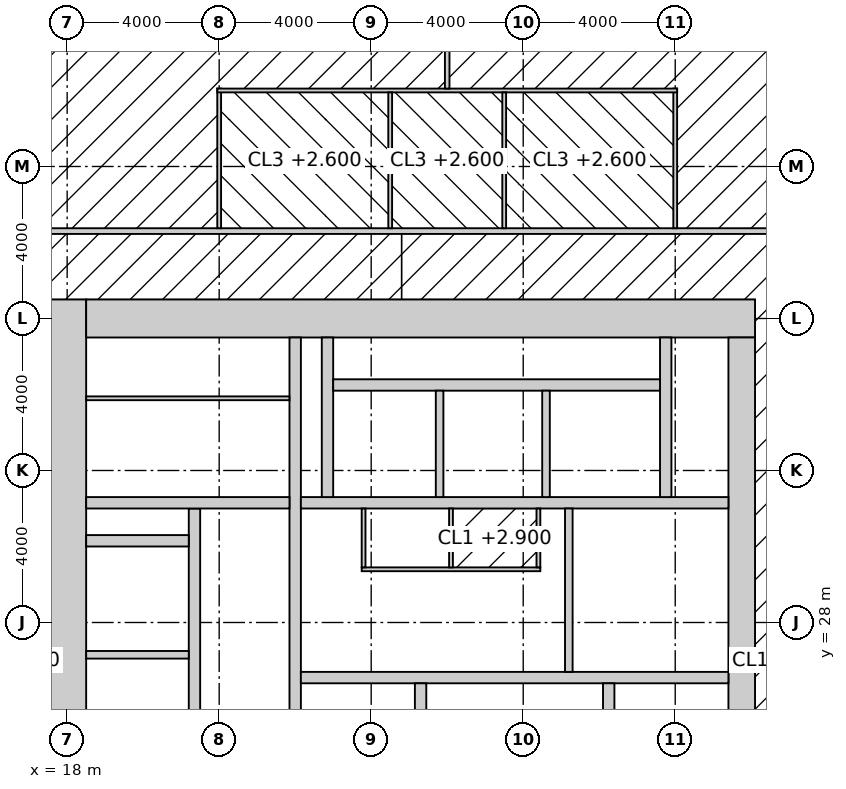
"""IFC4 building model, lengths in metres.
Left out: names, types, materials, properties, quantities, classifications, styles, units other than length and angle.
Written with IfcOpenShell. Run it as: python <this file> out.ifc"""

import sys

from ifc_helpers import new_model, si_unit, direction, frame, frame_2d, origin, place, context, subcontext, project, spatial, rectangle, extrude, element, fill, save


model = new_model("IFC4")
c1 = context("Model", 3, precision=1e-05, world=origin(), true_north=direction((0.0, 1.0)))
c2 = subcontext(c1, "Body", "Model", "MODEL_VIEW")
j1 = project(units=[si_unit("LENGTHUNIT", "METRE"), si_unit("PLANEANGLEUNIT", "RADIAN")], contexts=[c1])
p1 = place(None, origin())
s1 = spatial("IfcSite", under=j1, at=p1, CompositionType="ELEMENT")
p2 = place(p1, origin())
s2 = spatial("IfcBuilding", under=s1, at=p2, CompositionType="ELEMENT")
p3 = place(p2, frame((0.0, 0.0, 147.8)))
s3 = spatial("IfcBuildingStorey", under=s2, at=p3, CompositionType="ELEMENT", Elevation=147.8)
p4 = place(p3, frame((18.0, 17.5, -0.15), z_axis=(0.0, 0.0, 1.0), x_axis=(0.0, 1.0, 0.0)))
e1 = element("IfcWall", 1, at=p4, inside=s3, PredefinedType="SHEAR", context=c2, shape_type="SweptSolid", body=[
    extrude(rectangle(XDim=19.0, YDim=1.0, at=frame_2d((9.5, 0.0))), origin(), (0.0, 0.0, 1.0), 4.0),
])
p5 = place(p3, frame((18.5, 36.0, -0.15), z_axis=(0.0, 0.0, 1.0), x_axis=(1.0, 0.0, 0.0)))
e2 = element("IfcWall", 2, at=p5, inside=s3, PredefinedType="SHEAR", context=c2, shape_type="SweptSolid", body=[
    extrude(rectangle(XDim=17.6, YDim=1.0, at=frame_2d((8.8, 0.0))), origin(), (0.0, 0.0, 1.0), 4.0),
])
p6 = place(p3, frame((35.75, 18.5, -0.15), z_axis=(0.0, 0.0, 1.0), x_axis=(0.0, 1.0, 0.0)))
e3 = element("IfcWall", 3, at=p6, inside=s3, PredefinedType="SHEAR", context=c2, shape_type="SweptSolid", body=[
    extrude(rectangle(XDim=17.0, YDim=0.7, at=frame_2d((8.5, 0.0))), origin(), (0.0, 0.0, 1.0), 4.0),
])
p7 = place(p6, frame((9.85, 0.0, 0.15)))
e4 = element("IfcOpeningElement", 4, at=p7, cuts=e3, PredefinedType="OPENING", context=c2, shape_type="SweptSolid", body=[
    extrude(rectangle(XDim=1.0, YDim=2.2, at=frame_2d((0.5, 1.1))), frame((0.0, 0.36, 0.0), z_axis=(0.0, -1.0, 0.0), x_axis=(1.0, 0.0, 0.0)), (0.0, 0.0, 1.0), 0.72),
])
p8 = place(p3, frame((24.0, 18.5, -0.15), z_axis=(0.0, 0.0, 1.0), x_axis=(0.0, 1.0, 0.0)))
e5 = element("IfcWall", 5, at=p8, inside=s3, PredefinedType="SHEAR", context=c2, shape_type="SweptSolid", body=[
    extrude(rectangle(XDim=17.0, YDim=0.3, at=frame_2d((8.5, 0.0))), origin(), (0.0, 0.0, 1.0), 4.0),
])
p9 = place(p8, frame((9.6, 0.0, 0.15)))
e6 = element("IfcOpeningElement", 6, at=p9, cuts=e5, PredefinedType="OPENING", context=c2, shape_type="SweptSolid", body=[
    extrude(rectangle(XDim=1.5, YDim=2.4, at=frame_2d((0.75, 1.2))), frame((0.0, 0.16, 0.0), z_axis=(0.0, -1.0, 0.0), x_axis=(1.0, 0.0, 0.0)), (0.0, 0.0, 1.0), 0.32),
])
p10 = place(p3, frame((24.15, 26.55, -0.15), z_axis=(0.0, 0.0, 1.0), x_axis=(1.0, 0.0, 0.0)))
e7 = element("IfcWall", 7, at=p10, inside=s3, PredefinedType="SHEAR", context=c2, shape_type="SweptSolid", body=[
    extrude(rectangle(XDim=11.25, YDim=0.3, at=frame_2d((5.625, 0.0))), origin(), (0.0, 0.0, 1.0), 4.0),
])
p11 = place(p10, frame((9.25, 0.0, 0.15)))
e8 = element("IfcOpeningElement", 8, at=p11, cuts=e7, PredefinedType="OPENING", context=c2, shape_type="SweptSolid", body=[
    extrude(rectangle(XDim=1.0, YDim=2.2, at=frame_2d((0.5, 1.1))), frame((0.0, 0.16, 0.0), z_axis=(0.0, -1.0, 0.0), x_axis=(1.0, 0.0, 0.0)), (0.0, 0.0, 1.0), 0.32),
])
p12 = place(p10, frame((4.9, 0.0, 0.15)))
e9 = element("IfcOpeningElement", 9, at=p12, cuts=e7, PredefinedType="OPENING", context=c2, shape_type="SweptSolid", body=[
    extrude(rectangle(XDim=1.5, YDim=2.4, at=frame_2d((0.75, 1.2))), frame((0.0, 0.16, 0.0), z_axis=(0.0, -1.0, 0.0), x_axis=(1.0, 0.0, 0.0)), (0.0, 0.0, 1.0), 0.32),
])
p13 = place(p3, frame((27.3, 18.5, -0.15), z_axis=(0.0, 0.0, 1.0), x_axis=(0.0, 1.0, 0.0)))
e10 = element("IfcWall", 10, at=p13, inside=s3, PredefinedType="SHEAR", context=c2, shape_type="SweptSolid", body=[
    extrude(rectangle(XDim=7.9, YDim=0.3, at=frame_2d((3.95, 0.0))), origin(), (0.0, 0.0, 1.0), 4.0),
])
p14 = place(p13, frame((6.4, 0.0, 0.15)))
e11 = element("IfcOpeningElement", 11, at=p14, cuts=e10, PredefinedType="OPENING", context=c2, shape_type="SweptSolid", body=[
    extrude(rectangle(XDim=1.0, YDim=2.2, at=frame_2d((0.5, 1.1))), frame((0.0, 0.16, 0.0), z_axis=(0.0, -1.0, 0.0), x_axis=(1.0, 0.0, 0.0)), (0.0, 0.0, 1.0), 0.32),
])
p15 = place(p3, frame((32.25, 18.5, -0.15), z_axis=(0.0, 0.0, 1.0), x_axis=(0.0, 1.0, 0.0)))
e12 = element("IfcWall", 12, at=p15, inside=s3, PredefinedType="SHEAR", context=c2, shape_type="SweptSolid", body=[
    extrude(rectangle(XDim=7.9, YDim=0.3, at=frame_2d((3.95, 0.0))), origin(), (0.0, 0.0, 1.0), 4.0),
])
p16 = place(p3, frame((24.15, 31.15, -0.15), z_axis=(0.0, 0.0, 1.0), x_axis=(1.0, 0.0, 0.0)))
e13 = element("IfcWall", 13, at=p16, inside=s3, PredefinedType="SHEAR", context=c2, shape_type="SweptSolid", body=[
    extrude(rectangle(XDim=11.25, YDim=0.3, at=frame_2d((5.625, 0.0))), origin(), (0.0, 0.0, 1.0), 4.0),
])
p17 = place(p16, frame((7.25, 0.0, 0.15)))
e14 = element("IfcOpeningElement", 14, at=p17, cuts=e13, PredefinedType="OPENING", context=c2, shape_type="SweptSolid", body=[
    extrude(rectangle(XDim=1.4, YDim=2.4, at=frame_2d((0.7, 1.2))), frame((0.0, 0.16, 0.0), z_axis=(0.0, -1.0, 0.0), x_axis=(1.0, 0.0, 0.0)), (0.0, 0.0, 1.0), 0.32),
])
p18 = place(p3, frame((21.35, 18.5, -0.15), z_axis=(0.0, 0.0, 1.0), x_axis=(0.0, 1.0, 0.0)))
e15 = element("IfcWall", 15, at=p18, inside=s3, PredefinedType="SHEAR", context=c2, shape_type="SweptSolid", body=[
    extrude(rectangle(XDim=12.5, YDim=0.3, at=frame_2d((6.25, 0.0))), origin(), (0.0, 0.0, 1.0), 4.0),
])
p19 = place(p18, frame((0.875, 0.0, 0.15)))
e16 = element("IfcOpeningElement", 16, at=p19, cuts=e15, PredefinedType="OPENING", context=c2, shape_type="SweptSolid", body=[
    extrude(rectangle(XDim=1.1, YDim=2.2, at=frame_2d((0.55, 1.1))), frame((0.0, 0.16, 0.0), z_axis=(0.0, -1.0, 0.0), x_axis=(1.0, 0.0, 0.0)), (0.0, 0.0, 1.0), 0.32),
])
p20 = place(p18, frame((3.825, 0.0, 0.15)))
e17 = element("IfcOpeningElement", 17, at=p20, cuts=e15, PredefinedType="OPENING", context=c2, shape_type="SweptSolid", body=[
    extrude(rectangle(XDim=1.1, YDim=2.2, at=frame_2d((0.55, 1.1))), frame((0.0, 0.16, 0.0), z_axis=(0.0, -1.0, 0.0), x_axis=(1.0, 0.0, 0.0)), (0.0, 0.0, 1.0), 0.32),
])
p21 = place(p18, frame((6.675, 0.0, 0.15)))
e18 = element("IfcOpeningElement", 18, at=p21, cuts=e15, PredefinedType="OPENING", context=c2, shape_type="SweptSolid", body=[
    extrude(rectangle(XDim=1.1, YDim=2.2, at=frame_2d((0.55, 1.1))), frame((0.0, 0.16, 0.0), z_axis=(0.0, -1.0, 0.0), x_axis=(1.0, 0.0, 0.0)), (0.0, 0.0, 1.0), 0.32),
])
p22 = place(p18, frame((9.575, 0.0, 0.15)))
e19 = element("IfcOpeningElement", 19, at=p22, cuts=e15, PredefinedType="OPENING", context=c2, shape_type="SweptSolid", body=[
    extrude(rectangle(XDim=1.1, YDim=2.2, at=frame_2d((0.55, 1.1))), frame((0.0, 0.16, 0.0), z_axis=(0.0, -1.0, 0.0), x_axis=(1.0, 0.0, 0.0)), (0.0, 0.0, 1.0), 0.32),
])
p23 = place(p3, frame((18.5, 31.15, -0.15), z_axis=(0.0, 0.0, 1.0), x_axis=(1.0, 0.0, 0.0)))
e20 = element("IfcWall", 20, at=p23, inside=s3, PredefinedType="SHEAR", context=c2, shape_type="SweptSolid", body=[
    extrude(rectangle(XDim=5.35, YDim=0.3, at=frame_2d((2.675, 0.0))), origin(), (0.0, 0.0, 1.0), 4.0),
])
p24 = place(p23, frame((3.4, 0.0, 0.15)))
e21 = element("IfcOpeningElement", 21, at=p24, cuts=e20, PredefinedType="OPENING", context=c2, shape_type="SweptSolid", body=[
    extrude(rectangle(XDim=1.0, YDim=2.2, at=frame_2d((0.5, 1.1))), frame((0.0, 0.16, 0.0), z_axis=(0.0, -1.0, 0.0), x_axis=(1.0, 0.0, 0.0)), (0.0, 0.0, 1.0), 0.32),
])
p25 = place(p3, frame((18.5, 30.15, -0.15), z_axis=(0.0, 0.0, 1.0), x_axis=(1.0, 0.0, 0.0)))
e22 = element("IfcWall", 22, at=p25, inside=s3, PredefinedType="SHEAR", context=c2, shape_type="SweptSolid", body=[
    extrude(rectangle(XDim=2.7, YDim=0.3, at=frame_2d((1.35, 0.0))), origin(), (0.0, 0.0, 1.0), 4.0),
])
for number, where, z_axis, x_axis in (
    (23, (24.85, 31.3, -0.15), (0.0, 0.0, 1.0), (0.0, 1.0, 0.0)),
    (24, (33.75, 31.3, -0.15), (0.0, 0.0, 1.0), (0.0, 1.0, 0.0)),
):
    element("IfcWall", number, at=place(p3, frame(where, z_axis=z_axis, x_axis=x_axis)), inside=s3, PredefinedType="SHEAR", context=c2, shape_type="SweptSolid", body=[
        extrude(rectangle(XDim=4.2, YDim=0.3, at=frame_2d((2.1, 0.0))), origin(), (0.0, 0.0, 1.0), 4.0),
    ])
p26 = place(p3, frame((25.0, 34.25, -0.15), z_axis=(0.0, 0.0, 1.0), x_axis=(1.0, 0.0, 0.0)))
e25 = element("IfcWall", 25, at=p26, inside=s3, PredefinedType="SHEAR", context=c2, shape_type="SweptSolid", body=[
    extrude(rectangle(XDim=8.6, YDim=0.3, at=frame_2d((4.3, 0.0))), origin(), (0.0, 0.0, 1.0), 4.0),
])
for number, where, z_axis, x_axis in (
    (26, (27.8, 31.3, -0.15), (0.0, 0.0, 1.0), (0.0, 1.0, 0.0)),
    (27, (30.6, 31.3, -0.15), (0.0, 0.0, 1.0), (0.0, 1.0, 0.0)),
):
    element("IfcWall", number, at=place(p3, frame(where, z_axis=z_axis, x_axis=x_axis)), inside=s3, PredefinedType="SOLIDWALL", context=c2, shape_type="SweptSolid", body=[
        extrude(rectangle(XDim=2.8, YDim=0.2, at=frame_2d((1.4, 0.0))), origin(), (0.0, 0.0, 1.0), 4.0),
    ])
p27 = place(p3, frame((18.5, 27.15, -0.15), z_axis=(0.0, 0.0, 1.0), x_axis=(1.0, 0.0, 0.0)))
e28 = element("IfcWall", 28, at=p27, inside=s3, PredefinedType="SOLIDWALL", context=c2, shape_type="SweptSolid", body=[
    extrude(rectangle(XDim=2.7, YDim=0.2, at=frame_2d((1.35, 0.0))), origin(), (0.0, 0.0, 1.0), 4.0),
])
p28 = place(p3, frame((31.2, 26.7, 0.0), z_axis=(0.0, 0.0, 1.0), x_axis=(0.0, 1.0, 0.0)))
e29 = element("IfcWall", 29, at=p28, inside=s3, PredefinedType="SOLIDWALL", context=c2, shape_type="SweptSolid", body=[
    extrude(rectangle(XDim=4.3, YDim=0.2, at=frame_2d((2.15, 0.0))), origin(), (0.0, 0.0, 1.0), 3.85),
])
p29 = place(p3, frame((18.5, 33.9, 0.0), z_axis=(0.0, 0.0, 1.0), x_axis=(1.0, 0.0, 0.0)))
e30 = element("IfcWall", 30, at=p29, inside=s3, PredefinedType="PARTITIONING", context=c2, shape_type="SweptSolid", body=[
    extrude(rectangle(XDim=5.35, YDim=0.1, at=frame_2d((2.675, 0.0))), origin(), (0.0, 0.0, 1.0), 3.85),
])
p30 = place(p29, frame((1.2, 0.0, 0.0)))
e31 = element("IfcOpeningElement", 31, at=p30, cuts=e30, PredefinedType="OPENING", context=c2, shape_type="SweptSolid", body=[
    extrude(rectangle(XDim=1.0, YDim=2.2, at=frame_2d((0.5, 1.1))), frame((0.0, 0.06, 0.0), z_axis=(0.0, -1.0, 0.0), x_axis=(1.0, 0.0, 0.0)), (0.0, 0.0, 1.0), 0.12),
])
p31 = place(p3, frame((25.75, 29.4, 0.0), z_axis=(0.0, 0.0, 1.0), x_axis=(1.0, 0.0, 0.0)))
e32 = element("IfcWall", 32, at=p31, inside=s3, PredefinedType="PARTITIONING", context=c2, shape_type="SweptSolid", body=[
    extrude(rectangle(XDim=4.7, YDim=0.1, at=frame_2d((2.35, 0.0))), origin(), (0.0, 0.0, 1.0), 3.85),
])
p32 = place(p31, frame((0.7, 0.0, 0.0)))
e33 = element("IfcOpeningElement", 33, at=p32, cuts=e32, PredefinedType="OPENING", context=c2, shape_type="SweptSolid", body=[
    extrude(rectangle(XDim=1.0, YDim=2.2, at=frame_2d((0.5, 1.1))), frame((0.0, 0.06, 0.0), z_axis=(0.0, -1.0, 0.0), x_axis=(1.0, 0.0, 0.0)), (0.0, 0.0, 1.0), 0.12),
])
p33 = place(p31, frame((3.0, 0.0, 0.0)))
e34 = element("IfcOpeningElement", 34, at=p33, cuts=e32, PredefinedType="OPENING", context=c2, shape_type="SweptSolid", body=[
    extrude(rectangle(XDim=1.0, YDim=2.2, at=frame_2d((0.5, 1.1))), frame((0.0, 0.06, 0.0), z_axis=(0.0, -1.0, 0.0), x_axis=(1.0, 0.0, 0.0)), (0.0, 0.0, 1.0), 0.12),
])
for number, where, z_axis, x_axis in (
    (35, (25.8, 29.45, 0.0), (0.0, 0.0, 1.0), (0.0, 1.0, 0.0)),
    (36, (30.4, 29.45, 0.0), (0.0, 0.0, 1.0), (0.0, 1.0, 0.0)),
    (37, (28.1, 29.45, 0.0), (0.0, 0.0, 1.0), (0.0, 1.0, 0.0)),
):
    element("IfcWall", number, at=place(p3, frame(where, z_axis=z_axis, x_axis=x_axis)), inside=s3, PredefinedType="PARTITIONING", context=c2, shape_type="SweptSolid", body=[
        extrude(rectangle(XDim=1.55, YDim=0.1, at=frame_2d((0.775, 0.0))), origin(), (0.0, 0.0, 1.0), 3.85),
    ])
p34 = place(p3, frame((15.175, 38.3, 0.0), z_axis=(0.0, 0.0, 1.0), x_axis=(1.0, 0.0, 0.0)))
e38 = element("IfcWall", 38, at=p34, inside=s3, PredefinedType="PARTITIONING", context=c2, shape_type="SweptSolid", body=[
    extrude(rectangle(XDim=22.65, YDim=0.15, at=frame_2d((11.325, 0.0))), origin(), (0.0, 0.0, 1.0), 3.85),
])
p35 = place(p34, frame((8.575, 0.0, 0.0)))
e39 = element("IfcOpeningElement", 39, at=p35, cuts=e38, PredefinedType="OPENING", context=c2, shape_type="SweptSolid", body=[
    extrude(rectangle(XDim=0.9, YDim=2.1, at=frame_2d((0.45, 1.05))), frame((0.0, 0.085, 0.0), z_axis=(0.0, -1.0, 0.0), x_axis=(1.0, 0.0, 0.0)), (0.0, 0.0, 1.0), 0.17),
])
p36 = place(p34, frame((12.325, 0.0, 0.0)))
e40 = element("IfcOpeningElement", 40, at=p36, cuts=e38, PredefinedType="OPENING", context=c2, shape_type="SweptSolid", body=[
    extrude(rectangle(XDim=1.0, YDim=2.1, at=frame_2d((0.5, 1.05))), frame((0.0, 0.085, 0.0), z_axis=(0.0, -1.0, 0.0), x_axis=(1.0, 0.0, 0.0)), (0.0, 0.0, 1.0), 0.17),
])
p37 = place(p34, frame((16.175, 0.0, 0.0)))
e41 = element("IfcOpeningElement", 41, at=p37, cuts=e38, PredefinedType="OPENING", context=c2, shape_type="SweptSolid", body=[
    extrude(rectangle(XDim=0.9, YDim=2.1, at=frame_2d((0.45, 1.05))), frame((0.0, 0.085, 0.0), z_axis=(0.0, -1.0, 0.0), x_axis=(1.0, 0.0, 0.0)), (0.0, 0.0, 1.0), 0.17),
])
for number, where, z_axis, x_axis in (
    (42, (22.0, 38.375, 0.0), (0.0, 0.0, 1.0), (0.0, 1.0, 0.0)),
    (43, (34.0, 38.375, 0.0), (0.0, 0.0, 1.0), (0.0, 1.0, 0.0)),
):
    element("IfcWall", number, at=place(p3, frame(where, z_axis=z_axis, x_axis=x_axis)), inside=s3, PredefinedType="PARTITIONING", context=c2, shape_type="SweptSolid", body=[
        extrude(rectangle(XDim=3.675, YDim=0.1, at=frame_2d((1.837, 0.0))), origin(), (0.0, 0.0, 1.0), 2.95),
    ])
p38 = place(p3, frame((21.95, 42.0, 0.0), z_axis=(0.0, 0.0, 1.0), x_axis=(1.0, 0.0, 0.0)))
e44 = element("IfcWall", 44, at=p38, inside=s3, PredefinedType="PARTITIONING", context=c2, shape_type="SweptSolid", body=[
    extrude(rectangle(XDim=12.1, YDim=0.1, at=frame_2d((6.05, 0.0))), origin(), (0.0, 0.0, 1.0), 3.85),
])
for number, where, z_axis, x_axis in (
    (45, (26.5, 38.375, 0.0), (0.0, 0.0, 1.0), (0.0, 1.0, 0.0)),
    (46, (29.5, 38.375, 0.0), (0.0, 0.0, 1.0), (0.0, 1.0, 0.0)),
):
    element("IfcWall", number, at=place(p3, frame(where, z_axis=z_axis, x_axis=x_axis)), inside=s3, PredefinedType="PARTITIONING", context=c2, shape_type="SweptSolid", body=[
        extrude(rectangle(XDim=3.575, YDim=0.1, at=frame_2d((1.788, 0.0))), origin(), (0.0, 0.0, 1.0), 3.85),
    ])
p39 = place(p3, frame((28.0, 42.05, 0.0), z_axis=(0.0, 0.0, 1.0), x_axis=(0.0, 1.0, 0.0)))
e47 = element("IfcWall", 47, at=p39, inside=s3, PredefinedType="PARTITIONING", context=c2, shape_type="SweptSolid", body=[
    extrude(rectangle(XDim=9.65, YDim=0.12, at=frame_2d((4.825, 0.0))), origin(), (0.0, 0.0, 1.0), 3.85),
])
p40 = place(p14, origin())
e48 = element("IfcDoor", 48, at=p40, inside=s3, OperationType="SINGLE_SWING_RIGHT", PredefinedType="DOOR", context=c2, shape_type="SweptSolid", body=[
    extrude(rectangle(XDim=1.0, YDim=2.2, at=frame_2d((0.5, 1.1))), frame((0.0, 0.025, 0.0), z_axis=(0.0, -1.0, 0.0), x_axis=(1.0, 0.0, 0.0)), (0.0, 0.0, 1.0), 0.05),
])
fill(e11, e48)
p41 = place(p11, frame((1.0, 0.0, 0.0), z_axis=(0.0, 0.0, 1.0), x_axis=(-1.0, 0.0, 0.0)))
e49 = element("IfcDoor", 49, at=p41, inside=s3, OperationType="SINGLE_SWING_RIGHT", PredefinedType="DOOR", context=c2, shape_type="SweptSolid", body=[
    extrude(rectangle(XDim=1.0, YDim=2.2, at=frame_2d((0.5, 1.1))), frame((0.0, 0.025, 0.0), z_axis=(0.0, -1.0, 0.0), x_axis=(1.0, 0.0, 0.0)), (0.0, 0.0, 1.0), 0.05),
])
fill(e8, e49)
p42 = place(p7, origin())
e50 = element("IfcDoor", 50, at=p42, inside=s3, OperationType="SINGLE_SWING_RIGHT", PredefinedType="DOOR", context=c2, shape_type="SweptSolid", body=[
    extrude(rectangle(XDim=1.0, YDim=2.2, at=frame_2d((0.5, 1.1))), frame((0.0, 0.025, 0.0), z_axis=(0.0, -1.0, 0.0), x_axis=(1.0, 0.0, 0.0)), (0.0, 0.0, 1.0), 0.05),
])
fill(e4, e50)
p43 = place(p12, origin())
e51 = element("IfcDoor", 51, at=p43, inside=s3, OperationType="DOUBLE_DOOR_DOUBLE_SWING", PredefinedType="DOOR", context=c2, shape_type="SweptSolid", body=[
    extrude(rectangle(XDim=1.5, YDim=2.4, at=frame_2d((0.75, 1.2))), frame((0.0, 0.025, 0.0), z_axis=(0.0, -1.0, 0.0), x_axis=(1.0, 0.0, 0.0)), (0.0, 0.0, 1.0), 0.05),
])
fill(e9, e51)
p44 = place(p9, origin())
e52 = element("IfcDoor", 52, at=p44, inside=s3, OperationType="DOUBLE_DOOR_DOUBLE_SWING", PredefinedType="DOOR", context=c2, shape_type="SweptSolid", body=[
    extrude(rectangle(XDim=1.5, YDim=2.4, at=frame_2d((0.75, 1.2))), frame((0.0, 0.025, 0.0), z_axis=(0.0, -1.0, 0.0), x_axis=(1.0, 0.0, 0.0)), (0.0, 0.0, 1.0), 0.05),
])
fill(e6, e52)
p45 = place(p24, origin())
e53 = element("IfcDoor", 53, at=p45, inside=s3, OperationType="SINGLE_SWING_LEFT", PredefinedType="DOOR", context=c2, shape_type="SweptSolid", body=[
    extrude(rectangle(XDim=1.0, YDim=2.2, at=frame_2d((0.5, 1.1))), frame((0.0, 0.025, 0.0), z_axis=(0.0, -1.0, 0.0), x_axis=(1.0, 0.0, 0.0)), (0.0, 0.0, 1.0), 0.05),
])
fill(e21, e53)
p46 = place(p30, origin())
e54 = element("IfcDoor", 54, at=p46, inside=s3, OperationType="SINGLE_SWING_LEFT", PredefinedType="DOOR", context=c2, shape_type="SweptSolid", body=[
    extrude(rectangle(XDim=1.0, YDim=2.2, at=frame_2d((0.5, 1.1))), frame((0.0, 0.025, 0.0), z_axis=(0.0, -1.0, 0.0), x_axis=(1.0, 0.0, 0.0)), (0.0, 0.0, 1.0), 0.05),
])
fill(e31, e54)
p47 = place(p32, origin())
e55 = element("IfcDoor", 55, at=p47, inside=s3, OperationType="SINGLE_SWING_LEFT", PredefinedType="DOOR", context=c2, shape_type="SweptSolid", body=[
    extrude(rectangle(XDim=1.0, YDim=2.2, at=frame_2d((0.5, 1.1))), frame((0.0, 0.025, 0.0), z_axis=(0.0, -1.0, 0.0), x_axis=(1.0, 0.0, 0.0)), (0.0, 0.0, 1.0), 0.05),
])
fill(e33, e55)
p48 = place(p33, origin())
e56 = element("IfcDoor", 56, at=p48, inside=s3, OperationType="SINGLE_SWING_LEFT", PredefinedType="DOOR", context=c2, shape_type="SweptSolid", body=[
    extrude(rectangle(XDim=1.0, YDim=2.2, at=frame_2d((0.5, 1.1))), frame((0.0, 0.025, 0.0), z_axis=(0.0, -1.0, 0.0), x_axis=(1.0, 0.0, 0.0)), (0.0, 0.0, 1.0), 0.05),
])
fill(e34, e56)
p49 = place(p35, origin())
e57 = element("IfcDoor", 57, at=p49, inside=s3, OperationType="SINGLE_SWING_LEFT", PredefinedType="DOOR", context=c2, shape_type="SweptSolid", body=[
    extrude(rectangle(XDim=0.9, YDim=2.1, at=frame_2d((0.45, 1.05))), frame((0.0, 0.025, 0.0), z_axis=(0.0, -1.0, 0.0), x_axis=(1.0, 0.0, 0.0)), (0.0, 0.0, 1.0), 0.05),
])
fill(e39, e57)
p50 = place(p36, origin())
e58 = element("IfcDoor", 58, at=p50, inside=s3, OperationType="SLIDING_TO_LEFT", PredefinedType="DOOR", context=c2, shape_type="SweptSolid", body=[
    extrude(rectangle(XDim=1.0, YDim=2.1, at=frame_2d((0.5, 1.05))), frame((0.0, 0.025, 0.0), z_axis=(0.0, -1.0, 0.0), x_axis=(1.0, 0.0, 0.0)), (0.0, 0.0, 1.0), 0.05),
])
fill(e40, e58)
p51 = place(p37, origin())
e59 = element("IfcDoor", 59, at=p51, inside=s3, OperationType="SINGLE_SWING_LEFT", PredefinedType="DOOR", context=c2, shape_type="SweptSolid", body=[
    extrude(rectangle(XDim=0.9, YDim=2.1, at=frame_2d((0.45, 1.05))), frame((0.0, 0.025, 0.0), z_axis=(0.0, -1.0, 0.0), x_axis=(1.0, 0.0, 0.0)), (0.0, 0.0, 1.0), 0.05),
])
fill(e41, e59)
p52 = place(p17, origin())
e60 = element("IfcDoor", 60, at=p52, inside=s3, OperationType="DOUBLE_DOOR_SLIDING", PredefinedType="DOOR", context=c2, shape_type="SweptSolid", body=[
    extrude(rectangle(XDim=1.4, YDim=2.4, at=frame_2d((0.7, 1.2))), frame((0.0, 0.025, 0.0), z_axis=(0.0, -1.0, 0.0), x_axis=(1.0, 0.0, 0.0)), (0.0, 0.0, 1.0), 0.05),
])
fill(e14, e60)
p53 = place(p21, origin())
e61 = element("IfcDoor", 61, at=p53, inside=s3, OperationType="DOUBLE_DOOR_SLIDING", PredefinedType="DOOR", context=c2, shape_type="SweptSolid", body=[
    extrude(rectangle(XDim=1.1, YDim=2.2, at=frame_2d((0.55, 1.1))), frame((0.0, 0.025, 0.0), z_axis=(0.0, -1.0, 0.0), x_axis=(1.0, 0.0, 0.0)), (0.0, 0.0, 1.0), 0.05),
])
fill(e18, e61)
p54 = place(p22, origin())
e62 = element("IfcDoor", 62, at=p54, inside=s3, OperationType="DOUBLE_DOOR_SLIDING", PredefinedType="DOOR", context=c2, shape_type="SweptSolid", body=[
    extrude(rectangle(XDim=1.1, YDim=2.2, at=frame_2d((0.55, 1.1))), frame((0.0, 0.025, 0.0), z_axis=(0.0, -1.0, 0.0), x_axis=(1.0, 0.0, 0.0)), (0.0, 0.0, 1.0), 0.05),
])
fill(e19, e62)
save(model, sys.argv[1])
